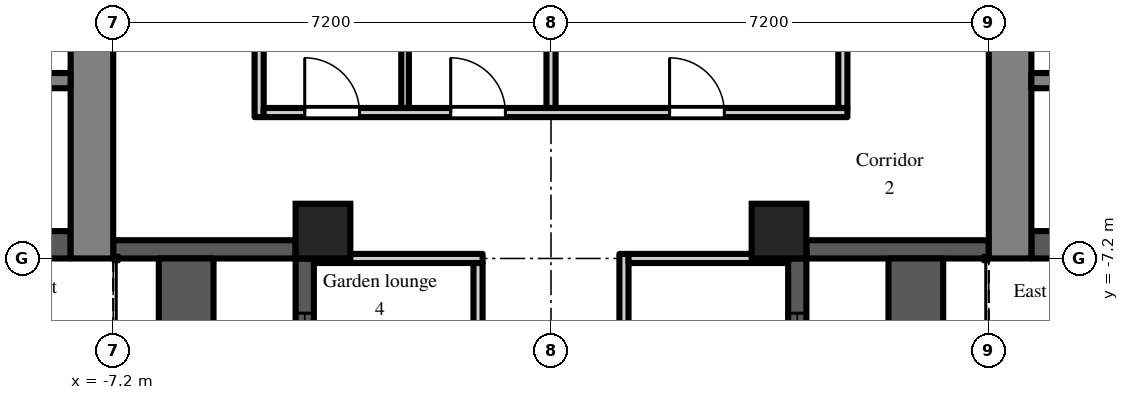
"""IFC4 building model, lengths in metres.
Left out: names, types, materials, properties, quantities, classifications, styles, units other than length and angle.
Written with IfcOpenShell. Run it as: python <this file> out.ifc"""

import sys

from ifc_helpers import new_model, si_unit, direction, frame, frame_2d, origin, origin_2d, place, context, subcontext, project, spatial, rectangle, extrude, element, fill, save


model = new_model("IFC4")
c1 = context("Model", 3, precision=1e-05, world=origin(), true_north=direction((0.0, 1.0)))
c2 = subcontext(c1, "Body", "Model", "MODEL_VIEW")
j1 = project(units=[si_unit("LENGTHUNIT", "METRE"), si_unit("PLANEANGLEUNIT", "RADIAN")], contexts=[c1])
p1 = place(None, origin())
s1 = spatial("IfcSite", under=j1, at=p1, CompositionType="ELEMENT")
p2 = place(p1, origin())
s2 = spatial("IfcBuilding", under=s1, at=p2, CompositionType="ELEMENT")
p3 = place(p2, frame((0.0, 0.0, 123.3)))
s3 = spatial("IfcBuildingStorey", under=s2, at=p3, CompositionType="ELEMENT", Elevation=123.3)
for number, where, z_axis, x_axis in (
    (1, (-3.75, -6.75, 0.0), (0.0, 0.0, 1.0), (1.0, 0.0, 0.0)),
    (2, (3.75, -6.75, 0.0), (0.0, 0.0, 1.0), (1.0, 0.0, 0.0)),
):
    element("IfcColumn", number, at=place(p3, frame(where, z_axis=z_axis, x_axis=x_axis)), inside=s3, PredefinedType="COLUMN", context=c2, shape_type="SweptSolid", body=[
        extrude(rectangle(XDim=0.9, YDim=0.9, at=origin_2d()), origin(), (0.0, 0.0, 1.0), 3.0),
    ])
p4 = place(p3, frame((-7.2, -7.05, 0.0), z_axis=(0.0, 0.0, 1.0), x_axis=(1.0, 0.0, 0.0)))
e3 = element("IfcWall", 3, at=p4, inside=s3, PredefinedType="SOLIDWALL", context=c2, shape_type="SweptSolid", body=[
    extrude(rectangle(XDim=3.0, YDim=0.3, at=frame_2d((1.5, 0.0))), origin(), (0.0, 0.0, 1.0), 2.2),
])
p5 = place(p3, frame((-4.05, -7.2, 0.0), z_axis=(0.0, 0.0, 1.0), x_axis=(0.0, -1.0, 0.0)))
e4 = element("IfcWall", 4, at=p5, inside=s3, PredefinedType="SOLIDWALL", context=c2, shape_type="SweptSolid", body=[
    extrude(rectangle(XDim=7.2, YDim=0.3, at=frame_2d((3.6, 0.0))), origin(), (0.0, 0.0, 1.0), 2.2),
])
p6 = place(p5, frame((3.0, 0.0, 0.0)))
e5 = element("IfcOpeningElement", 5, at=p6, cuts=e4, PredefinedType="OPENING", context=c2, shape_type="SweptSolid", body=[
    extrude(rectangle(XDim=1.2, YDim=2.05, at=frame_2d((0.6, 1.025))), frame((0.0, 0.16, 0.0), z_axis=(0.0, -1.0, 0.0), x_axis=(1.0, 0.0, 0.0)), (0.0, 0.0, 1.0), 0.32),
])
p7 = place(p5, frame((0.9, 0.0, 0.2)))
e6 = element("IfcOpeningElement", 6, at=p7, cuts=e4, PredefinedType="OPENING", context=c2, shape_type="SweptSolid", body=[
    extrude(rectangle(XDim=1.8, YDim=1.85, at=frame_2d((0.9, 0.925))), frame((0.0, 0.16, 0.0), z_axis=(0.0, -1.0, 0.0), x_axis=(1.0, 0.0, 0.0)), (0.0, 0.0, 1.0), 0.32),
])
p8 = place(p5, frame((4.5, 0.0, 0.2)))
e7 = element("IfcOpeningElement", 7, at=p8, cuts=e4, PredefinedType="OPENING", context=c2, shape_type="SweptSolid", body=[
    extrude(rectangle(XDim=1.8, YDim=1.85, at=frame_2d((0.9, 0.925))), frame((0.0, 0.16, 0.0), z_axis=(0.0, -1.0, 0.0), x_axis=(1.0, 0.0, 0.0)), (0.0, 0.0, 1.0), 0.32),
])
p9 = place(p3, frame((4.05, -14.4, 0.0), z_axis=(0.0, 0.0, 1.0), x_axis=(0.0, 1.0, 0.0)))
e8 = element("IfcWall", 8, at=p9, inside=s3, PredefinedType="SOLIDWALL", context=c2, shape_type="SweptSolid", body=[
    extrude(rectangle(XDim=7.2, YDim=0.3, at=frame_2d((3.6, 0.0))), origin(), (0.0, 0.0, 1.0), 2.2),
])
p10 = place(p9, frame((3.0, 0.0, 0.0)))
e9 = element("IfcOpeningElement", 9, at=p10, cuts=e8, PredefinedType="OPENING", context=c2, shape_type="SweptSolid", body=[
    extrude(rectangle(XDim=1.2, YDim=2.05, at=frame_2d((0.6, 1.025))), frame((0.0, 0.16, 0.0), z_axis=(0.0, -1.0, 0.0), x_axis=(1.0, 0.0, 0.0)), (0.0, 0.0, 1.0), 0.32),
])
p11 = place(p9, frame((0.9, 0.0, 0.2)))
e10 = element("IfcOpeningElement", 10, at=p11, cuts=e8, PredefinedType="OPENING", context=c2, shape_type="SweptSolid", body=[
    extrude(rectangle(XDim=1.8, YDim=1.85, at=frame_2d((0.9, 0.925))), frame((0.0, 0.16, 0.0), z_axis=(0.0, -1.0, 0.0), x_axis=(1.0, 0.0, 0.0)), (0.0, 0.0, 1.0), 0.32),
])
p12 = place(p9, frame((4.5, 0.0, 0.2)))
e11 = element("IfcOpeningElement", 11, at=p12, cuts=e8, PredefinedType="OPENING", context=c2, shape_type="SweptSolid", body=[
    extrude(rectangle(XDim=1.8, YDim=1.85, at=frame_2d((0.9, 0.925))), frame((0.0, 0.16, 0.0), z_axis=(0.0, -1.0, 0.0), x_axis=(1.0, 0.0, 0.0)), (0.0, 0.0, 1.0), 0.32),
])
p13 = place(p3, frame((4.2, -7.05, 0.0), z_axis=(0.0, 0.0, 1.0), x_axis=(1.0, 0.0, 0.0)))
e12 = element("IfcWall", 12, at=p13, inside=s3, PredefinedType="SOLIDWALL", context=c2, shape_type="SweptSolid", body=[
    extrude(rectangle(XDim=3.0, YDim=0.3, at=frame_2d((1.5, 0.0))), origin(), (0.0, 0.0, 1.0), 2.2),
])
for number, where, z_axis, x_axis in (
    (13, (6.0, -14.4, 0.0), (0.0, 0.0, 1.0), (0.0, 1.0, 0.0)),
    (14, (-6.0, -14.4, 0.0), (0.0, 0.0, 1.0), (0.0, 1.0, 0.0)),
):
    element("IfcWall", number, at=place(p3, frame(where, z_axis=z_axis, x_axis=x_axis)), inside=s3, PredefinedType="PARAPET", context=c2, shape_type="SweptSolid", body=[
        extrude(rectangle(XDim=7.2, YDim=0.9, at=frame_2d((3.6, 0.0))), origin(), (0.0, 0.0, 1.0), 0.8),
    ])
p14 = place(p3, frame((7.55, -7.2, 0.0), z_axis=(0.0, 0.0, 1.0), x_axis=(0.0, 1.0, 0.0)))
e15 = element("IfcWall", 15, at=p14, inside=s3, PredefinedType="SHEAR", context=c2, shape_type="SweptSolid", body=[
    extrude(rectangle(XDim=14.4, YDim=0.7, at=frame_2d((7.2, 0.0))), origin(), (0.0, 0.0, 1.0), 2.6),
])
p15 = place(p14, frame((6.0, 0.0, 0.0)))
e16 = element("IfcOpeningElement", 16, at=p15, cuts=e15, PredefinedType="OPENING", context=c2, shape_type="SweptSolid", body=[
    extrude(rectangle(XDim=2.4, YDim=2.2, at=frame_2d((1.2, 1.1))), frame((0.0, 0.36, 0.0), z_axis=(0.0, -1.0, 0.0), x_axis=(1.0, 0.0, 0.0)), (0.0, 0.0, 1.0), 0.72),
])
p16 = place(p3, frame((7.9, -6.975, 0.0), z_axis=(0.0, 0.0, 1.0), x_axis=(1.0, 0.0, 0.0)))
e17 = element("IfcWall", 17, at=p16, inside=s3, PredefinedType="SHEAR", context=c2, shape_type="SweptSolid", body=[
    extrude(rectangle(XDim=12.95, YDim=0.45, at=frame_2d((6.475, 0.0))), origin(), (0.0, 0.0, 1.0), 2.6),
])
p17 = place(p3, frame((7.9, -4.275, 0.0), z_axis=(0.0, 0.0, 1.0), x_axis=(1.0, 0.0, 0.0)))
e18 = element("IfcWall", 18, at=p17, inside=s3, PredefinedType="SHEAR", context=c2, shape_type="SweptSolid", body=[
    extrude(rectangle(XDim=1.95, YDim=0.25, at=frame_2d((0.975, 0.0))), origin(), (0.0, 0.0, 1.0), 2.6),
])
p18 = place(p3, frame((-7.55, -7.2, 0.0), z_axis=(0.0, 0.0, 1.0), x_axis=(0.0, 1.0, 0.0)))
e19 = element("IfcWall", 19, at=p18, inside=s3, PredefinedType="SHEAR", context=c2, shape_type="SweptSolid", body=[
    extrude(rectangle(XDim=14.4, YDim=0.7, at=frame_2d((7.2, 0.0))), origin(), (0.0, 0.0, 1.0), 2.6),
])
p19 = place(p18, frame((6.0, 0.0, 0.0)))
e20 = element("IfcOpeningElement", 20, at=p19, cuts=e19, PredefinedType="OPENING", context=c2, shape_type="SweptSolid", body=[
    extrude(rectangle(XDim=2.4, YDim=2.2, at=frame_2d((1.2, 1.1))), frame((0.0, 0.36, 0.0), z_axis=(0.0, -1.0, 0.0), x_axis=(1.0, 0.0, 0.0)), (0.0, 0.0, 1.0), 0.72),
])
p20 = place(p3, frame((-7.9, -6.975, 0.0), z_axis=(0.0, 0.0, 1.0), x_axis=(-1.0, 0.0, 0.0)))
e21 = element("IfcWall", 21, at=p20, inside=s3, PredefinedType="SHEAR", context=c2, shape_type="SweptSolid", body=[
    extrude(rectangle(XDim=12.95, YDim=0.45, at=frame_2d((6.475, 0.0))), origin(), (0.0, 0.0, 1.0), 2.6),
])
p21 = place(p3, frame((-7.9, -4.275, 0.0), z_axis=(0.0, 0.0, 1.0), x_axis=(-1.0, 0.0, 0.0)))
e22 = element("IfcWall", 22, at=p21, inside=s3, PredefinedType="SHEAR", context=c2, shape_type="SweptSolid", body=[
    extrude(rectangle(XDim=1.95, YDim=0.25, at=frame_2d((0.975, 0.0))), origin(), (0.0, 0.0, 1.0), 2.6),
])
p22 = place(p3, frame((-4.8, -4.875, 0.0), z_axis=(0.0, 0.0, 1.0), x_axis=(0.0, 1.0, 0.0)))
e23 = element("IfcWall", 23, at=p22, inside=s3, PredefinedType="PARTITIONING", context=c2, shape_type="SweptSolid", body=[
    extrude(rectangle(XDim=9.75, YDim=0.15, at=frame_2d((4.875, 0.0))), origin(), (0.0, 0.0, 1.0), 2.6),
])
p23 = place(p3, frame((-4.725, -4.8, 0.0), z_axis=(0.0, 0.0, 1.0), x_axis=(1.0, 0.0, 0.0)))
e24 = element("IfcWall", 24, at=p23, inside=s3, PredefinedType="PARTITIONING", context=c2, shape_type="SweptSolid", body=[
    extrude(rectangle(XDim=9.6, YDim=0.15, at=frame_2d((4.8, 0.0))), origin(), (0.0, 0.0, 1.0), 2.6),
])
p24 = place(p23, frame((0.675, 0.0, 0.0)))
e25 = element("IfcOpeningElement", 25, at=p24, cuts=e24, PredefinedType="OPENING", context=c2, shape_type="SweptSolid", body=[
    extrude(rectangle(XDim=0.9, YDim=2.1, at=frame_2d((0.45, 1.05))), frame((0.0, 0.085, 0.0), z_axis=(0.0, -1.0, 0.0), x_axis=(1.0, 0.0, 0.0)), (0.0, 0.0, 1.0), 0.17),
])
p25 = place(p23, frame((3.075, 0.0, 0.0)))
e26 = element("IfcOpeningElement", 26, at=p25, cuts=e24, PredefinedType="OPENING", context=c2, shape_type="SweptSolid", body=[
    extrude(rectangle(XDim=0.9, YDim=2.1, at=frame_2d((0.45, 1.05))), frame((0.0, 0.085, 0.0), z_axis=(0.0, -1.0, 0.0), x_axis=(1.0, 0.0, 0.0)), (0.0, 0.0, 1.0), 0.17),
])
p26 = place(p23, frame((6.675, 0.0, 0.0)))
e27 = element("IfcOpeningElement", 27, at=p26, cuts=e24, PredefinedType="OPENING", context=c2, shape_type="SweptSolid", body=[
    extrude(rectangle(XDim=0.9, YDim=2.1, at=frame_2d((0.45, 1.05))), frame((0.0, 0.085, 0.0), z_axis=(0.0, -1.0, 0.0), x_axis=(1.0, 0.0, 0.0)), (0.0, 0.0, 1.0), 0.17),
])
p27 = place(p3, frame((-3.9, -7.2, 0.0), z_axis=(0.0, 0.0, 1.0), x_axis=(1.0, 0.0, 0.0)))
e28 = element("IfcWall", 28, at=p27, inside=s3, PredefinedType="PARTITIONING", context=c2, shape_type="SweptSolid", body=[
    extrude(rectangle(XDim=2.775, YDim=0.15, at=frame_2d((1.387, 0.0))), origin(), (0.0, 0.0, 1.0), 2.6),
])
p28 = place(p3, frame((-2.4, -4.725, 0.0), z_axis=(0.0, 0.0, 1.0), x_axis=(0.0, 1.0, 0.0)))
e29 = element("IfcWall", 29, at=p28, inside=s3, PredefinedType="PARTITIONING", context=c2, shape_type="SweptSolid", body=[
    extrude(rectangle(XDim=2.263, YDim=0.125, at=frame_2d((1.131, 0.0))), origin(), (0.0, 0.0, 1.0), 2.6),
])
p29 = place(p3, frame((-1.2, -21.3, 0.0), z_axis=(0.0, 0.0, 1.0), x_axis=(0.0, 1.0, 0.0)))
e30 = element("IfcWall", 30, at=p29, inside=s3, PredefinedType="PARTITIONING", context=c2, shape_type="SweptSolid", body=[
    extrude(rectangle(XDim=14.025, YDim=0.15, at=frame_2d((7.013, 0.0))), origin(), (0.0, 0.0, 1.0), 2.6),
])
p30 = place(p29, frame((11.85, 0.0, 0.0)))
e31 = element("IfcOpeningElement", 31, at=p30, cuts=e30, PredefinedType="OPENING", context=c2, shape_type="SweptSolid", body=[
    extrude(rectangle(XDim=0.9, YDim=2.1, at=frame_2d((0.45, 1.05))), frame((0.0, 0.085, 0.0), z_axis=(0.0, -1.0, 0.0), x_axis=(1.0, 0.0, 0.0)), (0.0, 0.0, 1.0), 0.17),
])
p31 = place(p29, frame((5.7, 0.0, 0.0)))
e32 = element("IfcOpeningElement", 32, at=p31, cuts=e30, PredefinedType="OPENING", context=c2, shape_type="SweptSolid", body=[
    extrude(rectangle(XDim=1.0, YDim=2.1, at=frame_2d((0.5, 1.05))), frame((0.0, 0.085, 0.0), z_axis=(0.0, -1.0, 0.0), x_axis=(1.0, 0.0, 0.0)), (0.0, 0.0, 1.0), 0.17),
])
p32 = place(p29, frame((1.2, 0.0, 0.0)))
e33 = element("IfcOpeningElement", 33, at=p32, cuts=e30, PredefinedType="OPENING", context=c2, shape_type="SweptSolid", body=[
    extrude(rectangle(XDim=0.9, YDim=2.1, at=frame_2d((0.45, 1.05))), frame((0.0, 0.085, 0.0), z_axis=(0.0, -1.0, 0.0), x_axis=(1.0, 0.0, 0.0)), (0.0, 0.0, 1.0), 0.17),
])
p33 = place(p3, frame((0.0, -4.725, 0.0), z_axis=(0.0, 0.0, 1.0), x_axis=(0.0, 1.0, 0.0)))
e34 = element("IfcWall", 34, at=p33, inside=s3, PredefinedType="PARTITIONING", context=c2, shape_type="SweptSolid", body=[
    extrude(rectangle(XDim=2.25, YDim=0.15, at=frame_2d((1.125, 0.0))), origin(), (0.0, 0.0, 1.0), 2.6),
])
p34 = place(p3, frame((1.2, -21.3, 0.0), z_axis=(0.0, 0.0, 1.0), x_axis=(0.0, 1.0, 0.0)))
e35 = element("IfcWall", 35, at=p34, inside=s3, PredefinedType="PARTITIONING", context=c2, shape_type="SweptSolid", body=[
    extrude(rectangle(XDim=14.175, YDim=0.15, at=frame_2d((7.087, 0.0))), origin(), (0.0, 0.0, 1.0), 2.6),
])
p35 = place(p34, frame((8.25, 0.0, 0.0)))
e36 = element("IfcOpeningElement", 36, at=p35, cuts=e35, PredefinedType="OPENING", context=c2, shape_type="SweptSolid", body=[
    extrude(rectangle(XDim=0.9, YDim=2.1, at=frame_2d((0.45, 1.05))), frame((0.0, 0.085, 0.0), z_axis=(0.0, -1.0, 0.0), x_axis=(1.0, 0.0, 0.0)), (0.0, 0.0, 1.0), 0.17),
])
p36 = place(p34, frame((5.55, 0.0, 0.0)))
e37 = element("IfcOpeningElement", 37, at=p36, cuts=e35, PredefinedType="OPENING", context=c2, shape_type="SweptSolid", body=[
    extrude(rectangle(XDim=0.9, YDim=2.1, at=frame_2d((0.45, 1.05))), frame((0.0, 0.085, 0.0), z_axis=(0.0, -1.0, 0.0), x_axis=(1.0, 0.0, 0.0)), (0.0, 0.0, 1.0), 0.17),
])
p37 = place(p34, frame((3.75, 0.0, 0.0)))
e38 = element("IfcOpeningElement", 38, at=p37, cuts=e35, PredefinedType="OPENING", context=c2, shape_type="SweptSolid", body=[
    extrude(rectangle(XDim=0.9, YDim=2.1, at=frame_2d((0.45, 1.05))), frame((0.0, 0.085, 0.0), z_axis=(0.0, -1.0, 0.0), x_axis=(1.0, 0.0, 0.0)), (0.0, 0.0, 1.0), 0.17),
])
p38 = place(p34, frame((1.95, 0.0, 0.0)))
e39 = element("IfcOpeningElement", 39, at=p38, cuts=e35, PredefinedType="OPENING", context=c2, shape_type="SweptSolid", body=[
    extrude(rectangle(XDim=0.9, YDim=2.1, at=frame_2d((0.45, 1.05))), frame((0.0, 0.085, 0.0), z_axis=(0.0, -1.0, 0.0), x_axis=(1.0, 0.0, 0.0)), (0.0, 0.0, 1.0), 0.17),
])
p39 = place(p34, frame((0.3, 0.0, 0.0)))
e40 = element("IfcOpeningElement", 40, at=p39, cuts=e35, PredefinedType="OPENING", context=c2, shape_type="SweptSolid", body=[
    extrude(rectangle(XDim=0.9, YDim=2.1, at=frame_2d((0.45, 1.05))), frame((0.0, 0.085, 0.0), z_axis=(0.0, -1.0, 0.0), x_axis=(1.0, 0.0, 0.0)), (0.0, 0.0, 1.0), 0.17),
])
p40 = place(p3, frame((1.275, -7.2, 0.0), z_axis=(0.0, 0.0, 1.0), x_axis=(1.0, 0.0, 0.0)))
e41 = element("IfcWall", 41, at=p40, inside=s3, PredefinedType="PARTITIONING", context=c2, shape_type="SweptSolid", body=[
    extrude(rectangle(XDim=2.625, YDim=0.15, at=frame_2d((1.312, 0.0))), origin(), (0.0, 0.0, 1.0), 2.6),
])
p41 = place(p3, frame((4.8, -4.725, 0.0), z_axis=(0.0, 0.0, 1.0), x_axis=(0.0, 1.0, 0.0)))
e42 = element("IfcWall", 42, at=p41, inside=s3, PredefinedType="PARTITIONING", context=c2, shape_type="SweptSolid", body=[
    extrude(rectangle(XDim=9.45, YDim=0.15, at=frame_2d((4.725, 0.0))), origin(), (0.0, 0.0, 1.0), 2.6),
])
p42 = place(p7, origin())
e43 = element("IfcWindow", 43, at=p42, inside=s3, PartitioningType="SINGLE_PANEL", PredefinedType="WINDOW", context=c2, shape_type="SweptSolid", body=[
    extrude(rectangle(XDim=1.8, YDim=1.85, at=frame_2d((0.9, 0.925))), frame((0.0, 0.03, 0.0), z_axis=(0.0, -1.0, 0.0), x_axis=(1.0, 0.0, 0.0)), (0.0, 0.0, 1.0), 0.06),
])
fill(e6, e43)
p43 = place(p12, origin())
e44 = element("IfcWindow", 44, at=p43, inside=s3, PartitioningType="SINGLE_PANEL", PredefinedType="WINDOW", context=c2, shape_type="SweptSolid", body=[
    extrude(rectangle(XDim=1.8, YDim=1.85, at=frame_2d((0.9, 0.925))), frame((0.0, 0.03, 0.0), z_axis=(0.0, -1.0, 0.0), x_axis=(1.0, 0.0, 0.0)), (0.0, 0.0, 1.0), 0.06),
])
fill(e11, e44)
p44 = place(p24, origin())
e45 = element("IfcDoor", 45, at=p44, inside=s3, OperationType="SINGLE_SWING_LEFT", PredefinedType="DOOR", context=c2, shape_type="SweptSolid", body=[
    extrude(rectangle(XDim=0.9, YDim=2.1, at=frame_2d((0.45, 1.05))), frame((0.0, 0.025, 0.0), z_axis=(0.0, -1.0, 0.0), x_axis=(1.0, 0.0, 0.0)), (0.0, 0.0, 1.0), 0.05),
])
fill(e25, e45)
p45 = place(p25, origin())
e46 = element("IfcDoor", 46, at=p45, inside=s3, OperationType="SINGLE_SWING_LEFT", PredefinedType="DOOR", context=c2, shape_type="SweptSolid", body=[
    extrude(rectangle(XDim=0.9, YDim=2.1, at=frame_2d((0.45, 1.05))), frame((0.0, 0.025, 0.0), z_axis=(0.0, -1.0, 0.0), x_axis=(1.0, 0.0, 0.0)), (0.0, 0.0, 1.0), 0.05),
])
fill(e26, e46)
p46 = place(p26, origin())
e47 = element("IfcDoor", 47, at=p46, inside=s3, OperationType="SINGLE_SWING_LEFT", PredefinedType="DOOR", context=c2, shape_type="SweptSolid", body=[
    extrude(rectangle(XDim=0.9, YDim=2.1, at=frame_2d((0.45, 1.05))), frame((0.0, 0.025, 0.0), z_axis=(0.0, -1.0, 0.0), x_axis=(1.0, 0.0, 0.0)), (0.0, 0.0, 1.0), 0.05),
])
fill(e27, e47)
save(model, sys.argv[1])
